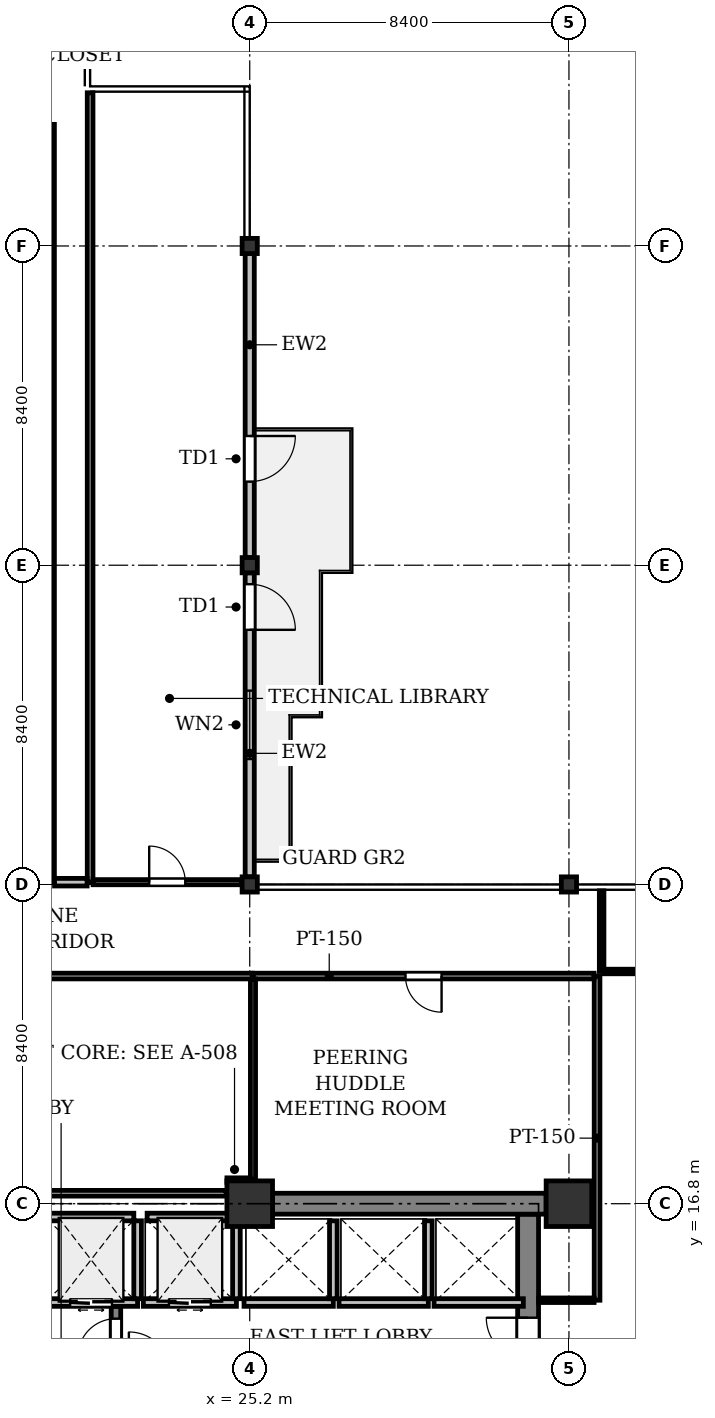
"""IFC4 building model, lengths in metres.
Left out: names, types, materials, properties, quantities, classifications, styles, units other than length and angle.
Written with IfcOpenShell. Run it as: python <this file> out.ifc"""

import sys

from ifc_helpers import new_model, si_unit, direction, frame, frame_2d, origin, origin_2d, place, context, subcontext, project, spatial, rectangle, i_section, extrude, element, fill, save


model = new_model("IFC4")
c1 = context("Model", 3, precision=1e-05, world=origin(), true_north=direction((0.0, 1.0)))
c2 = subcontext(c1, "Body", "Model", "MODEL_VIEW")
j1 = project(units=[si_unit("LENGTHUNIT", "METRE"), si_unit("PLANEANGLEUNIT", "RADIAN")], contexts=[c1])
p1 = place(None, origin())
s1 = spatial("IfcSite", under=j1, at=p1, CompositionType="ELEMENT")
p2 = place(p1, origin())
s2 = spatial("IfcBuilding", under=s1, at=p2, CompositionType="ELEMENT")
p3 = place(p2, frame((0.0, 0.0, 117.2)))
s3 = spatial("IfcBuildingStorey", under=s2, at=p3, CompositionType="ELEMENT", Elevation=117.2)
p4 = place(p3, frame((25.2, 16.8, 0.0), z_axis=(0.0, 0.0, 1.0), x_axis=(1.0, 0.0, 0.0)))
e1 = element("IfcColumn", 1, at=p4, inside=s3, PredefinedType="COLUMN", context=c2, shape_type="SweptSolid", body=[
    extrude(rectangle(XDim=1.2, YDim=1.2, at=origin_2d()), origin(), (0.0, 0.0, 1.0), 4.1),
])
for number, where, z_axis, x_axis in (
    (2, (25.2, 25.2, 0.0), (0.0, 0.0, 1.0), (1.0, 0.0, 0.0)),
    (3, (25.2, 33.6, 0.0), (0.0, 0.0, 1.0), (1.0, 0.0, 0.0)),
    (4, (25.2, 42.0, 0.0), (0.0, 0.0, 1.0), (1.0, 0.0, 0.0)),
):
    element("IfcColumn", number, at=place(p3, frame(where, z_axis=z_axis, x_axis=x_axis)), inside=s3, PredefinedType="COLUMN", context=c2, shape_type="SweptSolid", body=[
        extrude(i_section(OverallWidth=0.4, OverallDepth=0.4, WebThickness=0.025, FlangeThickness=0.04, at=origin_2d()), origin(), (0.0, 0.0, 1.0), 4.1),
    ])
p5 = place(p3, frame((33.6, 16.8, 0.0), z_axis=(0.0, 0.0, 1.0), x_axis=(1.0, 0.0, 0.0)))
e5 = element("IfcColumn", 5, at=p5, inside=s3, PredefinedType="COLUMN", context=c2, shape_type="SweptSolid", body=[
    extrude(rectangle(XDim=1.2, YDim=1.2, at=origin_2d()), origin(), (0.0, 0.0, 1.0), 4.1),
])
p6 = place(p3, frame((33.6, 25.2, 0.0), z_axis=(0.0, 0.0, 1.0), x_axis=(1.0, 0.0, 0.0)))
e6 = element("IfcColumn", 6, at=p6, inside=s3, PredefinedType="COLUMN", context=c2, shape_type="SweptSolid", body=[
    extrude(i_section(OverallWidth=0.4, OverallDepth=0.4, WebThickness=0.025, FlangeThickness=0.04, at=origin_2d()), origin(), (0.0, 0.0, 1.0), 4.1),
])
p7 = place(p3, frame((25.2, 41.8, 0.0), z_axis=(0.0, 0.0, 1.0), x_axis=(0.0, -1.0, 0.0)))
e7 = element("IfcWall", 7, at=p7, inside=s3, PredefinedType="STANDARD", context=c2, shape_type="SweptSolid", body=[
    extrude(rectangle(XDim=8.0, YDim=0.24, at=frame_2d((4.0, 0.0))), origin(), (0.0, 0.0, 1.0), 3.422),
])
p8 = place(p7, frame((4.8, 0.0, 0.0)))
e8 = element("IfcOpeningElement", 8, at=p8, cuts=e7, PredefinedType="OPENING", context=c2, shape_type="SweptSolid", body=[
    extrude(rectangle(XDim=1.2, YDim=2.2, at=frame_2d((0.6, 1.1))), frame((0.0, 0.13, 0.0), z_axis=(0.0, -1.0, 0.0), x_axis=(1.0, 0.0, 0.0)), (0.0, 0.0, 1.0), 0.26),
])
p9 = place(p3, frame((25.2, 33.4, 0.0), z_axis=(0.0, 0.0, 1.0), x_axis=(0.0, -1.0, 0.0)))
e9 = element("IfcWall", 9, at=p9, inside=s3, PredefinedType="STANDARD", context=c2, shape_type="SweptSolid", body=[
    extrude(rectangle(XDim=8.0, YDim=0.24, at=frame_2d((4.0, 0.0))), origin(), (0.0, 0.0, 1.0), 3.422),
])
p10 = place(p9, frame((0.3, 0.0, 0.0)))
e10 = element("IfcOpeningElement", 10, at=p10, cuts=e9, PredefinedType="OPENING", context=c2, shape_type="SweptSolid", body=[
    extrude(rectangle(XDim=1.2, YDim=2.2, at=frame_2d((0.6, 1.1))), frame((0.0, 0.13, 0.0), z_axis=(0.0, -1.0, 0.0), x_axis=(1.0, 0.0, 0.0)), (0.0, 0.0, 1.0), 0.26),
])
p11 = place(p9, frame((3.1, 0.0, 0.9)))
e11 = element("IfcOpeningElement", 11, at=p11, cuts=e9, PredefinedType="OPENING", context=c2, shape_type="SweptSolid", body=[
    extrude(rectangle(XDim=1.8, YDim=1.6, at=frame_2d((0.9, 0.8))), frame((0.0, 0.13, 0.0), z_axis=(0.0, -1.0, 0.0), x_axis=(1.0, 0.0, 0.0)), (0.0, 0.0, 1.0), 0.26),
])
p12 = place(p3, frame((32.525, 8.675, 0.0), z_axis=(0.0, 0.0, 1.0), x_axis=(0.0, 1.0, 0.0)))
e12 = element("IfcWall", 12, at=p12, inside=s3, PredefinedType="SHEAR", context=c2, shape_type="SweptSolid", body=[
    extrude(rectangle(XDim=7.85, YDim=0.55, at=frame_2d((3.925, 0.0))), origin(), (0.0, 0.0, 1.0), 3.825),
])
p13 = place(p12, frame((4.025, 0.0, 0.0)))
e13 = element("IfcOpeningElement", 13, at=p13, cuts=e12, PredefinedType="OPENING", context=c2, shape_type="SweptSolid", body=[
    extrude(rectangle(XDim=1.1, YDim=2.15, at=frame_2d((0.55, 1.075))), frame((0.0, 0.285, 0.0), z_axis=(0.0, -1.0, 0.0), x_axis=(1.0, 0.0, 0.0)), (0.0, 0.0, 1.0), 0.57),
])
p14 = place(p3, frame((25.8, 16.8, 0.0), z_axis=(0.0, 0.0, 1.0), x_axis=(1.0, 0.0, 0.0)))
e14 = element("IfcWall", 14, at=p14, inside=s3, PredefinedType="SHEAR", context=c2, shape_type="SweptSolid", body=[
    extrude(rectangle(XDim=7.2, YDim=0.55, at=frame_2d((3.6, 0.0))), origin(), (0.0, 0.0, 1.0), 3.825),
])
p15 = place(p3, frame((21.68, 12.45, 0.0), z_axis=(0.0, 0.0, 1.0), x_axis=(0.0, 1.0, 0.0)))
e15 = element("IfcWall", 15, at=p15, inside=s3, PredefinedType="SHEAR", context=c2, shape_type="SweptSolid", body=[
    extrude(rectangle(XDim=1.65, YDim=0.25, at=frame_2d((0.825, 0.0))), origin(), (0.0, 0.0, 1.0), 3.825),
])
p16 = place(p15, frame((0.325, 0.0, 0.0)))
e16 = element("IfcOpeningElement", 16, at=p16, cuts=e15, PredefinedType="OPENING", context=c2, shape_type="SweptSolid", body=[
    extrude(rectangle(XDim=1.0, YDim=2.15, at=frame_2d((0.5, 1.075))), frame((0.0, 0.135, 0.0), z_axis=(0.0, -1.0, 0.0), x_axis=(1.0, 0.0, 0.0)), (0.0, 0.0, 1.0), 0.27),
])
p17 = place(p3, frame((19.8, 14.2, 0.0), z_axis=(0.0, 0.0, 1.0), x_axis=(1.0, 0.0, 0.0)))
e17 = element("IfcWall", 17, at=p17, inside=s3, PredefinedType="PARTITIONING", context=c2, shape_type="SweptSolid", body=[
    extrude(rectangle(XDim=2.45, YDim=0.2, at=frame_2d((1.225, 0.0))), origin(), (0.0, 0.0, 1.0), 3.825),
])
p18 = place(p17, frame((0.675, 0.0, 0.0)))
e18 = element("IfcOpeningElement", 18, at=p18, cuts=e17, PredefinedType="OPENING", context=c2, shape_type="SweptSolid", body=[
    extrude(rectangle(XDim=1.1, YDim=2.2, at=frame_2d((0.55, 1.1))), frame((0.0, 0.11, 0.0), z_axis=(0.0, -1.0, 0.0), x_axis=(1.0, 0.0, 0.0)), (0.0, 0.0, 1.0), 0.22),
])
p19 = place(p3, frame((22.25, 14.3, 0.0), z_axis=(0.0, 0.0, 1.0), x_axis=(0.0, 1.0, 0.0)))
e19 = element("IfcWall", 19, at=p19, inside=s3, PredefinedType="PARTITIONING", context=c2, shape_type="SweptSolid", body=[
    extrude(rectangle(XDim=2.05, YDim=0.2, at=frame_2d((1.025, 0.0))), origin(), (0.0, 0.0, 1.0), 3.825),
])
p20 = place(p3, frame((19.9, 16.45, 0.0), z_axis=(0.0, 0.0, 1.0), x_axis=(1.0, 0.0, 0.0)))
e20 = element("IfcWall", 20, at=p20, inside=s3, PredefinedType="PARTITIONING", context=c2, shape_type="SweptSolid", body=[
    extrude(rectangle(XDim=2.25, YDim=0.2, at=frame_2d((1.125, 0.0))), origin(), (0.0, 0.0, 1.0), 3.825),
])
p21 = place(p3, frame((22.4, 14.2, 0.0), z_axis=(0.0, 0.0, 1.0), x_axis=(1.0, 0.0, 0.0)))
e21 = element("IfcWall", 21, at=p21, inside=s3, PredefinedType="PARTITIONING", context=c2, shape_type="SweptSolid", body=[
    extrude(rectangle(XDim=2.45, YDim=0.2, at=frame_2d((1.225, 0.0))), origin(), (0.0, 0.0, 1.0), 3.825),
])
p22 = place(p21, frame((0.675, 0.0, 0.0)))
e22 = element("IfcOpeningElement", 22, at=p22, cuts=e21, PredefinedType="OPENING", context=c2, shape_type="SweptSolid", body=[
    extrude(rectangle(XDim=1.1, YDim=2.2, at=frame_2d((0.55, 1.1))), frame((0.0, 0.11, 0.0), z_axis=(0.0, -1.0, 0.0), x_axis=(1.0, 0.0, 0.0)), (0.0, 0.0, 1.0), 0.22),
])
p23 = place(p3, frame((24.85, 14.3, 0.0), z_axis=(0.0, 0.0, 1.0), x_axis=(0.0, 1.0, 0.0)))
e23 = element("IfcWall", 23, at=p23, inside=s3, PredefinedType="PARTITIONING", context=c2, shape_type="SweptSolid", body=[
    extrude(rectangle(XDim=2.05, YDim=0.2, at=frame_2d((1.025, 0.0))), origin(), (0.0, 0.0, 1.0), 3.825),
])
p24 = place(p3, frame((22.5, 16.45, 0.0), z_axis=(0.0, 0.0, 1.0), x_axis=(1.0, 0.0, 0.0)))
e24 = element("IfcWall", 24, at=p24, inside=s3, PredefinedType="PARTITIONING", context=c2, shape_type="SweptSolid", body=[
    extrude(rectangle(XDim=2.25, YDim=0.2, at=frame_2d((1.125, 0.0))), origin(), (0.0, 0.0, 1.0), 3.825),
])
p25 = place(p3, frame((25.05, 14.2, 0.0), z_axis=(0.0, 0.0, 1.0), x_axis=(1.0, 0.0, 0.0)))
e25 = element("IfcWall", 25, at=p25, inside=s3, PredefinedType="PARTITIONING", context=c2, shape_type="SweptSolid", body=[
    extrude(rectangle(XDim=2.35, YDim=0.2, at=frame_2d((1.175, 0.0))), origin(), (0.0, 0.0, 1.0), 3.825),
])
p26 = place(p3, frame((27.4, 14.3, 0.0), z_axis=(0.0, 0.0, 1.0), x_axis=(0.0, 1.0, 0.0)))
e26 = element("IfcWall", 26, at=p26, inside=s3, PredefinedType="PARTITIONING", context=c2, shape_type="SweptSolid", body=[
    extrude(rectangle(XDim=2.05, YDim=0.2, at=frame_2d((1.025, 0.0))), origin(), (0.0, 0.0, 1.0), 3.825),
])
p27 = place(p3, frame((27.55, 14.2, 0.0), z_axis=(0.0, 0.0, 1.0), x_axis=(1.0, 0.0, 0.0)))
e27 = element("IfcWall", 27, at=p27, inside=s3, PredefinedType="PARTITIONING", context=c2, shape_type="SweptSolid", body=[
    extrude(rectangle(XDim=2.35, YDim=0.2, at=frame_2d((1.175, 0.0))), origin(), (0.0, 0.0, 1.0), 3.825),
])
p28 = place(p3, frame((29.9, 14.3, 0.0), z_axis=(0.0, 0.0, 1.0), x_axis=(0.0, 1.0, 0.0)))
e28 = element("IfcWall", 28, at=p28, inside=s3, PredefinedType="PARTITIONING", context=c2, shape_type="SweptSolid", body=[
    extrude(rectangle(XDim=2.05, YDim=0.2, at=frame_2d((1.025, 0.0))), origin(), (0.0, 0.0, 1.0), 3.825),
])
p29 = place(p3, frame((30.05, 14.2, 0.0), z_axis=(0.0, 0.0, 1.0), x_axis=(1.0, 0.0, 0.0)))
e29 = element("IfcWall", 29, at=p29, inside=s3, PredefinedType="PARTITIONING", context=c2, shape_type="SweptSolid", body=[
    extrude(rectangle(XDim=2.35, YDim=0.2, at=frame_2d((1.175, 0.0))), origin(), (0.0, 0.0, 1.0), 3.825),
])
p30 = place(p3, frame((34.34, 14.26, 0.0), z_axis=(0.0, 0.0, 1.0), x_axis=(0.0, 1.0, 0.0)))
e30 = element("IfcWall", 30, at=p30, inside=s3, PredefinedType="PARTITIONING", context=c2, shape_type="SweptSolid", body=[
    extrude(rectangle(XDim=8.53, YDim=0.15, at=frame_2d((4.265, 0.0))), origin(), (0.0, 0.0, 1.0), 3.292),
])
p31 = place(p3, frame((34.261, 22.79, 0.0), z_axis=(0.0, 0.0, 1.0), x_axis=(-1.0, 0.0, 0.0)))
e31 = element("IfcWall", 31, at=p31, inside=s3, PredefinedType="PARTITIONING", context=c2, shape_type="SweptSolid", body=[
    extrude(rectangle(XDim=8.975, YDim=0.15, at=frame_2d((4.488, 0.0))), origin(), (0.0, 0.0, 1.0), 3.297),
])
p32 = place(p31, frame((4.013, 0.0, 0.0)))
e32 = element("IfcOpeningElement", 32, at=p32, cuts=e31, PredefinedType="OPENING", context=c2, shape_type="SweptSolid", body=[
    extrude(rectangle(XDim=0.95, YDim=2.15, at=frame_2d((0.475, 1.075))), frame((0.0, 0.085, 0.0), z_axis=(0.0, -1.0, 0.0), x_axis=(1.0, 0.0, 0.0)), (0.0, 0.0, 1.0), 0.17),
])
p33 = place(p3, frame((25.286, 22.711, 0.0), z_axis=(0.0, 0.0, 1.0), x_axis=(0.0, -1.0, 0.0)))
e33 = element("IfcWall", 33, at=p33, inside=s3, PredefinedType="PARTITIONING", context=c2, shape_type="SweptSolid", body=[
    extrude(rectangle(XDim=5.291, YDim=0.135, at=frame_2d((2.646, 0.0))), origin(), (0.0, 0.0, 1.0), 3.297),
])
p34 = place(p3, frame((32.804, 14.26, 0.0), z_axis=(0.0, 0.0, 1.0), x_axis=(1.0, 0.0, 0.0)))
e34 = element("IfcWall", 34, at=p34, inside=s3, PredefinedType="PARTITIONING", context=c2, shape_type="SweptSolid", body=[
    extrude(rectangle(XDim=1.457, YDim=0.12, at=frame_2d((0.729, 0.0))), origin(), (0.0, 0.0, 1.0), 3.297),
])
p35 = place(p3, frame((17.42, 17.075, 0.0), z_axis=(0.0, 0.0, 1.0), x_axis=(1.0, 0.0, 0.0)))
e35 = element("IfcWall", 35, at=p35, inside=s3, PredefinedType="PARTITIONING", context=c2, shape_type="SweptSolid", body=[
    extrude(rectangle(XDim=7.16, YDim=0.15, at=frame_2d((3.58, 0.0))), origin(), (0.0, 0.0, 1.0), 3.469),
])
p36 = place(p3, frame((24.6, 17.42, 0.0), z_axis=(0.0, 0.0, 1.0), x_axis=(1.0, 0.0, 0.0)))
e36 = element("IfcWall", 36, at=p36, inside=s3, PredefinedType="PARTITIONING", context=c2, shape_type="SweptSolid", body=[
    extrude(rectangle(XDim=0.614, YDim=0.12, at=frame_2d((0.307, 0.0))), origin(), (0.0, 0.0, 1.0), 3.297),
])
p37 = place(p3, frame((25.266, 22.79, 0.0), z_axis=(0.0, 0.0, 1.0), x_axis=(-1.0, 0.0, 0.0)))
e37 = element("IfcWall", 37, at=p37, inside=s3, PredefinedType="PARTITIONING", context=c2, shape_type="SweptSolid", body=[
    extrude(rectangle(XDim=17.556, YDim=0.15, at=frame_2d((8.778, 0.0))), origin(), (0.0, 0.0, 1.0), 3.297),
])
p38 = place(p37, frame((8.303, 0.0, 0.0)))
e38 = element("IfcOpeningElement", 38, at=p38, cuts=e37, PredefinedType="OPENING", context=c2, shape_type="SweptSolid", body=[
    extrude(rectangle(XDim=0.95, YDim=2.15, at=frame_2d((0.475, 1.075))), frame((0.0, 0.085, 0.0), z_axis=(0.0, -1.0, 0.0), x_axis=(1.0, 0.0, 0.0)), (0.0, 0.0, 1.0), 0.17),
])
p39 = place(p3, frame((34.46, 25.031, 0.0), z_axis=(0.0, 0.0, 1.0), x_axis=(0.0, -1.0, 0.0)))
e39 = element("IfcWall", 39, at=p39, inside=s3, PredefinedType="PARTITIONING", context=c2, shape_type="SweptSolid", body=[
    extrude(rectangle(XDim=2.121, YDim=0.12, at=frame_2d((1.061, 0.0))), origin(), (0.0, 0.0, 1.0), 3.825),
])
p40 = place(p3, frame((34.524, 22.91, 0.0), z_axis=(0.0, 0.0, 1.0), x_axis=(1.0, 0.0, 0.0)))
e40 = element("IfcWall", 40, at=p40, inside=s3, PredefinedType="PARTITIONING", context=c2, shape_type="SweptSolid", body=[
    extrude(rectangle(XDim=2.126, YDim=0.12, at=frame_2d((1.063, 0.0))), origin(), (0.0, 0.0, 1.0), 3.825),
])
p41 = place(p3, frame((21.0, 46.031, 0.0), z_axis=(0.0, 0.0, 1.0), x_axis=(0.0, -1.0, 0.0)))
e41 = element("IfcWall", 41, at=p41, inside=s3, PredefinedType="PARTITIONING", context=c2, shape_type="SweptSolid", body=[
    extrude(rectangle(XDim=20.771, YDim=0.15, at=frame_2d((10.385, 0.0))), origin(), (0.0, 0.0, 1.0), 3.292),
])
p42 = place(p3, frame((21.079, 25.26, 0.0), z_axis=(0.0, 0.0, 1.0), x_axis=(1.0, 0.0, 0.0)))
e42 = element("IfcWall", 42, at=p42, inside=s3, PredefinedType="PARTITIONING", context=c2, shape_type="SweptSolid", body=[
    extrude(rectangle(XDim=3.901, YDim=0.135, at=frame_2d((1.95, 0.0))), origin(), (0.0, 0.0, 1.0), 3.292),
])
p43 = place(p42, frame((1.476, 0.0, 0.0)))
e43 = element("IfcOpeningElement", 43, at=p43, cuts=e42, PredefinedType="OPENING", context=c2, shape_type="SweptSolid", body=[
    extrude(rectangle(XDim=0.95, YDim=2.15, at=frame_2d((0.475, 1.075))), frame((0.0, 0.077, 0.0), z_axis=(0.0, -1.0, 0.0), x_axis=(1.0, 0.0, 0.0)), (0.0, 0.0, 1.0), 0.155),
])
p44 = place(p3, frame((19.96, 45.2, 0.0), z_axis=(0.0, 0.0, 1.0), x_axis=(0.0, -1.0, 0.0)))
e44 = element("IfcWall", 44, at=p44, inside=s3, PredefinedType="PARTITIONING", context=c2, shape_type="SweptSolid", body=[
    extrude(rectangle(XDim=19.94, YDim=0.2, at=frame_2d((9.97, 0.0))), origin(), (0.0, 0.0, 1.0), 3.292),
])
p45 = place(p3, frame((20.064, 25.26, 0.0), z_axis=(0.0, 0.0, 1.0), x_axis=(1.0, 0.0, 0.0)))
e45 = element("IfcWall", 45, at=p45, inside=s3, PredefinedType="PARTITIONING", context=c2, shape_type="SweptSolid", body=[
    extrude(rectangle(XDim=0.857, YDim=0.2, at=frame_2d((0.428, 0.0))), origin(), (0.0, 0.0, 1.0), 3.292),
])
p46 = place(p8, origin())
e46 = element("IfcDoor", 46, at=p46, inside=s3, OperationType="SINGLE_SWING_LEFT", PredefinedType="DOOR", context=c2, shape_type="SweptSolid", body=[
    extrude(rectangle(XDim=1.2, YDim=2.2, at=frame_2d((0.6, 1.1))), frame((0.0, 0.025, 0.0), z_axis=(0.0, -1.0, 0.0), x_axis=(1.0, 0.0, 0.0)), (0.0, 0.0, 1.0), 0.05),
])
fill(e8, e46)
p47 = place(p10, origin())
e47 = element("IfcDoor", 47, at=p47, inside=s3, OperationType="SINGLE_SWING_RIGHT", PredefinedType="DOOR", context=c2, shape_type="SweptSolid", body=[
    extrude(rectangle(XDim=1.2, YDim=2.2, at=frame_2d((0.6, 1.1))), frame((0.0, 0.025, 0.0), z_axis=(0.0, -1.0, 0.0), x_axis=(1.0, 0.0, 0.0)), (0.0, 0.0, 1.0), 0.05),
])
fill(e10, e47)
p48 = place(p11, origin())
e48 = element("IfcWindow", 48, at=p48, inside=s3, PartitioningType="SINGLE_PANEL", PredefinedType="WINDOW", context=c2, shape_type="SweptSolid", body=[
    extrude(rectangle(XDim=1.8, YDim=1.6, at=frame_2d((0.9, 0.8))), frame((0.0, 0.03, 0.0), z_axis=(0.0, -1.0, 0.0), x_axis=(1.0, 0.0, 0.0)), (0.0, 0.0, 1.0), 0.06),
])
fill(e11, e48)
p49 = place(p13, origin())
e49 = element("IfcDoor", 49, at=p49, inside=s3, OperationType="SINGLE_SWING_RIGHT", PredefinedType="DOOR", context=c2, shape_type="SweptSolid", body=[
    extrude(rectangle(XDim=1.1, YDim=2.15, at=frame_2d((0.55, 1.075))), frame((0.0, 0.025, 0.0), z_axis=(0.0, -1.0, 0.0), x_axis=(1.0, 0.0, 0.0)), (0.0, 0.0, 1.0), 0.05),
])
fill(e13, e49)
p50 = place(p16, origin())
e50 = element("IfcDoor", 50, at=p50, inside=s3, OperationType="SINGLE_SWING_LEFT", PredefinedType="DOOR", context=c2, shape_type="SweptSolid", body=[
    extrude(rectangle(XDim=1.0, YDim=2.15, at=frame_2d((0.5, 1.075))), frame((0.0, 0.025, 0.0), z_axis=(0.0, -1.0, 0.0), x_axis=(1.0, 0.0, 0.0)), (0.0, 0.0, 1.0), 0.05),
])
fill(e16, e50)
p51 = place(p18, origin())
e51 = element("IfcDoor", 51, at=p51, inside=s3, OperationType="DOUBLE_DOOR_SLIDING", PredefinedType="DOOR", context=c2, shape_type="SweptSolid", body=[
    extrude(rectangle(XDim=1.1, YDim=2.2, at=frame_2d((0.55, 1.1))), frame((0.0, 0.025, 0.0), z_axis=(0.0, -1.0, 0.0), x_axis=(1.0, 0.0, 0.0)), (0.0, 0.0, 1.0), 0.05),
])
fill(e18, e51)
p52 = place(p22, origin())
e52 = element("IfcDoor", 52, at=p52, inside=s3, OperationType="DOUBLE_DOOR_SLIDING", PredefinedType="DOOR", context=c2, shape_type="SweptSolid", body=[
    extrude(rectangle(XDim=1.1, YDim=2.2, at=frame_2d((0.55, 1.1))), frame((0.0, 0.025, 0.0), z_axis=(0.0, -1.0, 0.0), x_axis=(1.0, 0.0, 0.0)), (0.0, 0.0, 1.0), 0.05),
])
fill(e22, e52)
p53 = place(p32, origin())
e53 = element("IfcDoor", 53, at=p53, inside=s3, OperationType="SINGLE_SWING_LEFT", PredefinedType="DOOR", context=c2, shape_type="SweptSolid", body=[
    extrude(rectangle(XDim=0.95, YDim=2.15, at=frame_2d((0.475, 1.075))), frame((0.0, 0.025, 0.0), z_axis=(0.0, -1.0, 0.0), x_axis=(1.0, 0.0, 0.0)), (0.0, 0.0, 1.0), 0.05),
])
fill(e32, e53)
p54 = place(p43, origin())
e54 = element("IfcDoor", 54, at=p54, inside=s3, OperationType="SINGLE_SWING_LEFT", PredefinedType="DOOR", context=c2, shape_type="SweptSolid", body=[
    extrude(rectangle(XDim=0.95, YDim=2.15, at=frame_2d((0.475, 1.075))), frame((0.0, 0.025, 0.0), z_axis=(0.0, -1.0, 0.0), x_axis=(1.0, 0.0, 0.0)), (0.0, 0.0, 1.0), 0.05),
])
fill(e43, e54)
save(model, sys.argv[1])
